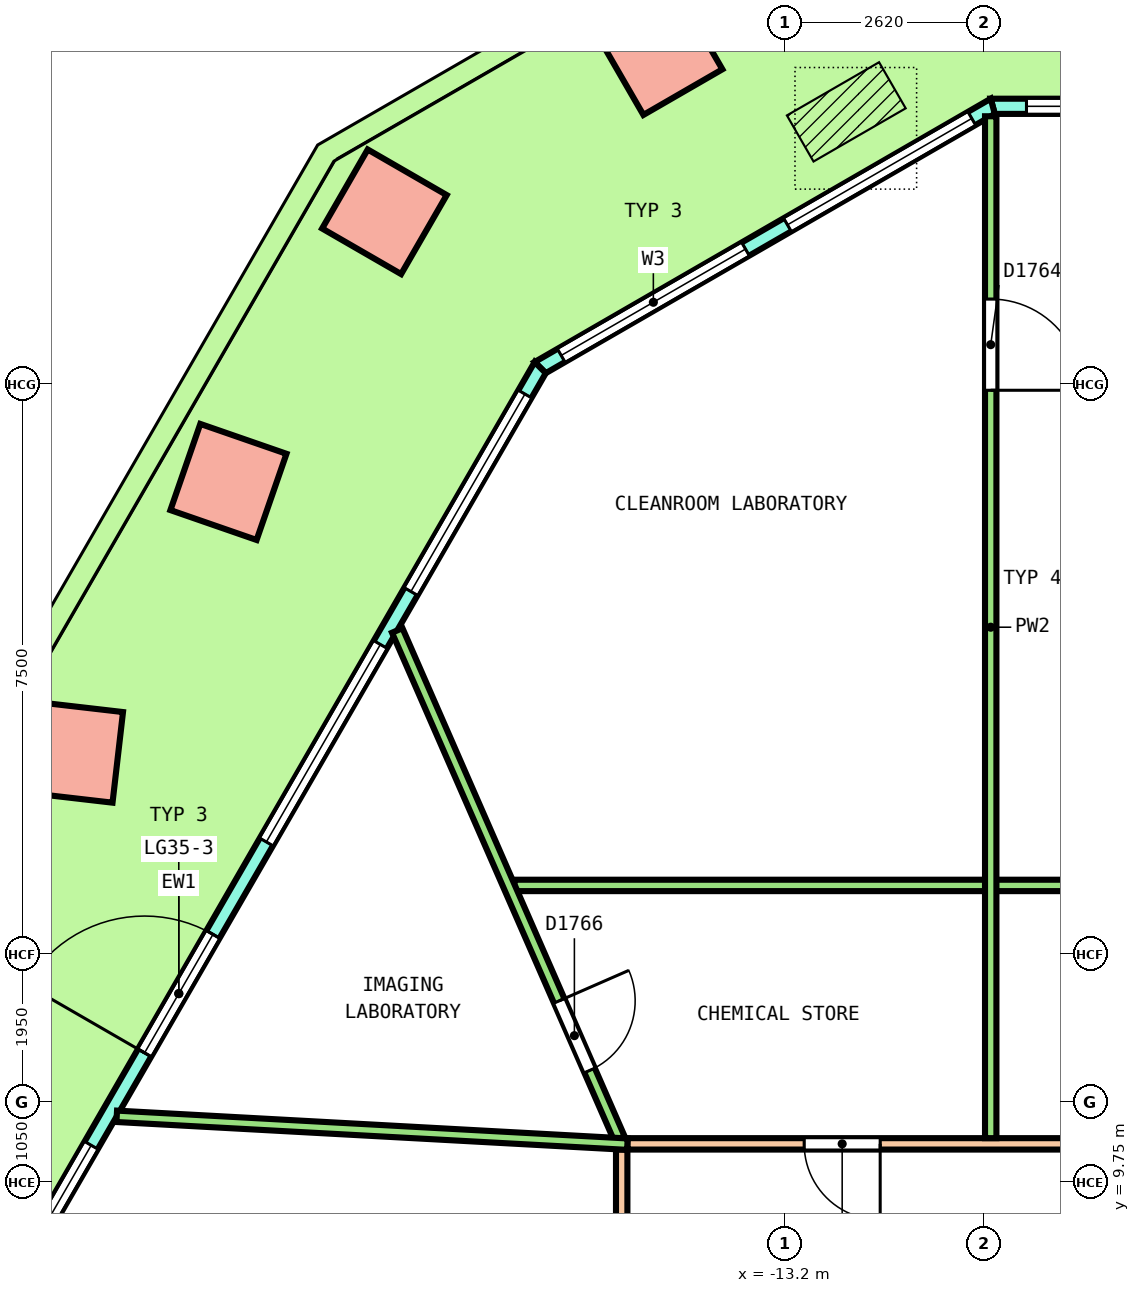
"""IFC4 building model, lengths in metres.
Left out: names, types, materials, properties, quantities, classifications, styles, units other than length and angle.
Written with IfcOpenShell. Run it as: python <this file> out.ifc"""

import sys

from ifc_helpers import new_model, si_unit, direction, frame, frame_2d, origin, origin_2d, place, context, subcontext, project, spatial, polyline, rectangle, outline, extrude, element, fill, save


model = new_model("IFC4")
c1 = context("Model", 3, precision=1e-05, world=origin(), true_north=direction((0.0, 1.0)))
c2 = subcontext(c1, "Body", "Model", "MODEL_VIEW")
j1 = project(units=[si_unit("LENGTHUNIT", "METRE"), si_unit("PLANEANGLEUNIT", "RADIAN")], contexts=[c1])
p1 = place(None, origin())
s1 = spatial("IfcSite", under=j1, at=p1, CompositionType="ELEMENT")
p2 = place(p1, origin())
s2 = spatial("IfcBuilding", under=s1, at=p2, CompositionType="ELEMENT")
p3 = place(p2, frame((0.0, 0.0, 162.8)))
s3 = spatial("IfcBuildingStorey", under=s2, at=p3, CompositionType="ELEMENT", Elevation=162.8)
for number, where, z_axis, x_axis in (
    (1, (-14.845, 24.606, 0.0), (-0.036, 0.0, 0.999), (-0.865, -0.5, -0.031)),
    (2, (-18.472, 22.512, 0.0), (-0.036, 0.0, 0.999), (-0.499, -0.866, -0.018)),
):
    element("IfcColumn", number, at=place(p3, frame(where, z_axis=z_axis, x_axis=x_axis)), inside=s3, PredefinedType="COLUMN", context=c2, shape_type="SweptSolid", body=[
        extrude(rectangle(XDim=1.2, YDim=1.2, at=origin_2d()), origin(), (0.0, 0.0, 1.0), 4.053),
    ])
p4 = place(p3, frame((-20.524, 18.958, 0.0), z_axis=(-0.032654187208, 0.006265748099, 0.999447069363), x_axis=(-0.499519823947, -0.866234008258, -0.010889831076)))
e3 = element("IfcColumn", 3, at=p4, inside=s3, PredefinedType="COLUMN", context=c2, shape_type="SweptSolid", body=[
    extrude(rectangle(XDim=1.2, YDim=1.2, at=origin_2d()), origin(), (0.0, 0.0, 1.0), 4.052),
])
p5 = place(p3, frame((-22.576, 15.404, 0.0), z_axis=(-0.029040860623, 0.012532155622, 0.999499661576), x_axis=(-0.499041572146, -0.866570424295, -0.003634419767)))
e4 = element("IfcColumn", 4, at=p5, inside=s3, PredefinedType="COLUMN", context=c2, shape_type="SweptSolid", body=[
    extrude(rectangle(XDim=1.2, YDim=1.2, at=origin_2d()), origin(), (0.0, 0.0, 1.0), 4.052),
])
p6 = place(p3, frame((10.468, 23.9, 0.0), z_axis=(0.0, 0.0, 1.0), x_axis=(-1.0, 0.0, 0.0)))
e5 = element("IfcWall", 5, at=p6, inside=s3, PredefinedType="SOLIDWALL", context=c2, shape_type="SweptSolid", body=[
    extrude(outline(polyline([(-0.027, -0.1), (1.023, -0.1), (2.072, -0.1), (3.122, -0.1), (4.171, -0.1), (5.221, -0.1), (6.27, -0.1), (7.32, -0.1), (8.369, -0.1), (9.419, -0.1), (10.468, -0.1), (11.518, -0.1), (12.567, -0.1), (13.617, -0.1), (14.666, -0.1), (15.716, -0.1), (16.765, -0.1), (17.815, -0.1), (18.864, -0.1), (19.914, -0.1), (20.963, -0.1), (20.91, 0.1), (19.865, 0.1), (18.821, 0.1), (17.777, 0.1), (16.733, 0.1), (15.689, 0.1), (14.645, 0.1), (13.601, 0.1), (12.557, 0.1), (11.512, 0.1), (10.468, 0.1), (9.424, 0.1), (8.38, 0.1), (7.336, 0.1), (6.292, 0.1), (5.248, 0.1), (4.203, 0.1), (3.159, 0.1), (2.115, 0.1), (1.071, 0.1), (0.027, 0.1), (-0.027, -0.1)])), origin(), (0.0, 0.0, 1.0), 4.1),
])
p7 = place(p6, frame((0.444, 0.0, 0.1)))
e6 = element("IfcOpeningElement", 6, at=p7, cuts=e5, PredefinedType="OPENING", context=c2, shape_type="SweptSolid", body=[
    extrude(rectangle(XDim=3.3, YDim=2.9, at=frame_2d((1.65, 1.45))), frame((0.0, 0.11, 0.0), z_axis=(0.0, -1.0, 0.0), x_axis=(1.0, 0.0, 0.0)), (0.0, 0.0, 1.0), 0.22),
])
p8 = place(p6, frame((4.631, 0.0, 0.1)))
e7 = element("IfcOpeningElement", 7, at=p8, cuts=e5, PredefinedType="OPENING", context=c2, shape_type="SweptSolid", body=[
    extrude(rectangle(XDim=3.3, YDim=2.9, at=frame_2d((1.65, 1.45))), frame((0.0, 0.11, 0.0), z_axis=(0.0, -1.0, 0.0), x_axis=(1.0, 0.0, 0.0)), (0.0, 0.0, 1.0), 0.22),
])
p9 = place(p6, frame((9.568, 0.0, 0.0)))
e8 = element("IfcOpeningElement", 8, at=p9, cuts=e5, PredefinedType="OPENING", context=c2, shape_type="SweptSolid", body=[
    extrude(rectangle(XDim=1.8, YDim=2.4, at=frame_2d((0.9, 1.2))), frame((0.0, 0.11, 0.0), z_axis=(0.0, -1.0, 0.0), x_axis=(1.0, 0.0, 0.0)), (0.0, 0.0, 1.0), 0.22),
])
p10 = place(p6, frame((9.568, 0.0, 2.55)))
e9 = element("IfcOpeningElement", 9, at=p10, cuts=e5, PredefinedType="OPENING", context=c2, shape_type="SweptSolid", body=[
    extrude(rectangle(XDim=1.8, YDim=0.45, at=frame_2d((0.9, 0.225))), frame((0.0, 0.11, 0.0), z_axis=(0.0, -1.0, 0.0), x_axis=(1.0, 0.0, 0.0)), (0.0, 0.0, 1.0), 0.22),
])
p11 = place(p6, frame((13.006, 0.0, 0.1)))
e10 = element("IfcOpeningElement", 10, at=p11, cuts=e5, PredefinedType="OPENING", context=c2, shape_type="SweptSolid", body=[
    extrude(rectangle(XDim=3.3, YDim=2.9, at=frame_2d((1.65, 1.45))), frame((0.0, 0.11, 0.0), z_axis=(0.0, -1.0, 0.0), x_axis=(1.0, 0.0, 0.0)), (0.0, 0.0, 1.0), 0.22),
])
p12 = place(p6, frame((17.193, 0.0, 0.1)))
e11 = element("IfcOpeningElement", 11, at=p12, cuts=e5, PredefinedType="OPENING", context=c2, shape_type="SweptSolid", body=[
    extrude(rectangle(XDim=3.3, YDim=2.9, at=frame_2d((1.65, 1.45))), frame((0.0, 0.11, 0.0), z_axis=(0.0, -1.0, 0.0), x_axis=(1.0, 0.0, 0.0)), (0.0, 0.0, 1.0), 0.22),
])
p13 = place(p3, frame((-10.468, 23.9, 0.0), z_axis=(0.0, 0.0, 1.0), x_axis=(-0.866029458321, -0.49999297727, 0.0)))
e12 = element("IfcWall", 12, at=p13, inside=s3, PredefinedType="SOLIDWALL", context=c2, shape_type="SweptSolid", body=[
    extrude(outline(polyline([(-0.027, -0.1), (1.128, -0.1), (2.282, -0.1), (3.437, -0.1), (4.592, -0.1), (5.747, -0.1), (6.901, -0.1), (6.848, 0.1), (5.711, 0.1), (4.574, 0.1), (3.437, 0.1), (2.301, 0.1), (1.164, 0.1), (0.027, 0.1), (-0.027, -0.1)])), origin(), (0.0, 0.0, 1.0), 4.1),
])
p14 = place(p13, frame((0.319, 0.0, 0.1)))
e13 = element("IfcOpeningElement", 13, at=p14, cuts=e12, PredefinedType="OPENING", context=c2, shape_type="SweptSolid", body=[
    extrude(rectangle(XDim=2.8, YDim=2.9, at=frame_2d((1.4, 1.45))), frame((0.0, 0.11, 0.0), z_axis=(0.0, -1.0, 0.0), x_axis=(1.0, 0.0, 0.0)), (0.0, 0.0, 1.0), 0.22),
])
p15 = place(p13, frame((3.756, 0.0, 0.1)))
e14 = element("IfcOpeningElement", 14, at=p15, cuts=e12, PredefinedType="OPENING", context=c2, shape_type="SweptSolid", body=[
    extrude(rectangle(XDim=2.8, YDim=2.9, at=frame_2d((1.4, 1.45))), frame((0.0, 0.11, 0.0), z_axis=(0.0, -1.0, 0.0), x_axis=(1.0, 0.0, 0.0)), (0.0, 0.0, 1.0), 0.22),
])
p16 = place(p3, frame((-16.422, 20.463, 0.0), z_axis=(0.0, 0.0, 1.0), x_axis=(-0.500001707189, -0.866024418136, 0.0)))
e15 = element("IfcWall", 15, at=p16, inside=s3, PredefinedType="SOLIDWALL", context=c2, shape_type="SweptSolid", body=[
    extrude(outline(polyline([(-0.027, -0.1), (0.977, -0.1), (1.981, -0.1), (2.985, -0.1), (3.989, -0.1), (4.993, -0.1), (5.997, -0.1), (7.0, -0.1), (8.004, -0.1), (9.008, -0.1), (10.012, -0.1), (11.016, -0.1), (12.02, -0.1), (13.024, -0.1), (14.028, -0.1), (15.032, -0.1), (16.036, -0.1), (17.04, -0.1), (18.043, -0.1), (19.047, -0.1), (18.994, 0.1), (17.995, 0.1), (16.997, 0.1), (15.999, 0.1), (15.001, 0.1), (14.002, 0.1), (13.004, 0.1), (12.006, 0.1), (11.008, 0.1), (10.009, 0.1), (9.011, 0.1), (8.013, 0.1), (7.015, 0.1), (6.016, 0.1), (5.018, 0.1), (4.02, 0.1), (3.022, 0.1), (2.023, 0.1), (1.025, 0.1), (0.027, 0.1), (-0.027, -0.1)])), origin(), (0.0, 0.0, 1.0), 4.1),
])
p17 = place(p16, frame((0.402, 0.0, 0.1)))
e16 = element("IfcOpeningElement", 16, at=p17, cuts=e15, PredefinedType="OPENING", context=c2, shape_type="SweptSolid", body=[
    extrude(rectangle(XDim=3.0, YDim=2.9, at=frame_2d((1.5, 1.45))), frame((0.0, 0.11, 0.0), z_axis=(0.0, -1.0, 0.0), x_axis=(1.0, 0.0, 0.0)), (0.0, 0.0, 1.0), 0.22),
])
p18 = place(p16, frame((4.206, 0.0, 0.1)))
e17 = element("IfcOpeningElement", 17, at=p18, cuts=e15, PredefinedType="OPENING", context=c2, shape_type="SweptSolid", body=[
    extrude(rectangle(XDim=3.0, YDim=2.9, at=frame_2d((1.5, 1.45))), frame((0.0, 0.11, 0.0), z_axis=(0.0, -1.0, 0.0), x_axis=(1.0, 0.0, 0.0)), (0.0, 0.0, 1.0), 0.22),
])
p19 = place(p16, frame((8.61, 0.0, 0.0)))
e18 = element("IfcOpeningElement", 18, at=p19, cuts=e15, PredefinedType="OPENING", context=c2, shape_type="SweptSolid", body=[
    extrude(rectangle(XDim=1.8, YDim=2.4, at=frame_2d((0.9, 1.2))), frame((0.0, 0.11, 0.0), z_axis=(0.0, -1.0, 0.0), x_axis=(1.0, 0.0, 0.0)), (0.0, 0.0, 1.0), 0.22),
])
p20 = place(p16, frame((8.61, 0.0, 2.55)))
e19 = element("IfcOpeningElement", 19, at=p20, cuts=e15, PredefinedType="OPENING", context=c2, shape_type="SweptSolid", body=[
    extrude(rectangle(XDim=1.8, YDim=0.45, at=frame_2d((0.9, 0.225))), frame((0.0, 0.11, 0.0), z_axis=(0.0, -1.0, 0.0), x_axis=(1.0, 0.0, 0.0)), (0.0, 0.0, 1.0), 0.22),
])
p21 = place(p16, frame((11.814, 0.0, 0.1)))
e20 = element("IfcOpeningElement", 20, at=p21, cuts=e15, PredefinedType="OPENING", context=c2, shape_type="SweptSolid", body=[
    extrude(rectangle(XDim=3.0, YDim=2.9, at=frame_2d((1.5, 1.45))), frame((0.0, 0.11, 0.0), z_axis=(0.0, -1.0, 0.0), x_axis=(1.0, 0.0, 0.0)), (0.0, 0.0, 1.0), 0.22),
])
p22 = place(p16, frame((15.618, 0.0, 0.1)))
e21 = element("IfcOpeningElement", 21, at=p22, cuts=e15, PredefinedType="OPENING", context=c2, shape_type="SweptSolid", body=[
    extrude(rectangle(XDim=3.0, YDim=2.9, at=frame_2d((1.5, 1.45))), frame((0.0, 0.11, 0.0), z_axis=(0.0, -1.0, 0.0), x_axis=(1.0, 0.0, 0.0)), (0.0, 0.0, 1.0), 0.22),
])
p23 = place(p3, frame((-15.275, 10.25, 0.0), z_axis=(0.0, 0.0, 1.0), x_axis=(1.0, 0.0, 0.0)))
e22 = element("IfcWall", 22, at=p23, inside=s3, PredefinedType="PARTITIONING", context=c2, shape_type="SweptSolid", body=[
    extrude(rectangle(XDim=30.55, YDim=0.15, at=frame_2d((15.275, 0.0))), origin(), (0.0, 0.0, 1.0), 3.05),
])
p24 = place(p23, frame((26.909, 0.0, 0.0)))
e23 = element("IfcOpeningElement", 23, at=p24, cuts=e22, PredefinedType="OPENING", context=c2, shape_type="SweptSolid", body=[
    extrude(rectangle(XDim=1.0, YDim=2.1, at=frame_2d((0.5, 1.05))), frame((0.0, 0.085, 0.0), z_axis=(0.0, -1.0, 0.0), x_axis=(1.0, 0.0, 0.0)), (0.0, 0.0, 1.0), 0.17),
])
p25 = place(p23, frame((14.675, 0.0, 0.0)))
e24 = element("IfcOpeningElement", 24, at=p25, cuts=e22, PredefinedType="OPENING", context=c2, shape_type="SweptSolid", body=[
    extrude(rectangle(XDim=1.2, YDim=2.1, at=frame_2d((0.6, 1.05))), frame((0.0, 0.085, 0.0), z_axis=(0.0, -1.0, 0.0), x_axis=(1.0, 0.0, 0.0)), (0.0, 0.0, 1.0), 0.17),
])
p26 = place(p23, frame((2.326, 0.0, 0.0)))
e25 = element("IfcOpeningElement", 25, at=p26, cuts=e22, PredefinedType="OPENING", context=c2, shape_type="SweptSolid", body=[
    extrude(rectangle(XDim=1.0, YDim=2.1, at=frame_2d((0.5, 1.05))), frame((0.0, 0.085, 0.0), z_axis=(0.0, -1.0, 0.0), x_axis=(1.0, 0.0, 0.0)), (0.0, 0.0, 1.0), 0.17),
])
p27 = place(p3, frame((-15.35, -0.254, 0.0), z_axis=(0.0, 0.0, 1.0), x_axis=(0.0, 1.0, 0.0)))
e26 = element("IfcWall", 26, at=p27, inside=s3, PredefinedType="PARTITIONING", context=c2, shape_type="SweptSolid", body=[
    extrude(rectangle(XDim=10.429, YDim=0.15, at=frame_2d((5.214, 0.0))), origin(), (0.0, 0.0, 1.0), 3.05),
])
p28 = place(p27, frame((3.312, 0.0, 0.0)))
e27 = element("IfcOpeningElement", 27, at=p28, cuts=e26, PredefinedType="OPENING", context=c2, shape_type="SweptSolid", body=[
    extrude(rectangle(XDim=1.2, YDim=2.1, at=frame_2d((0.6, 1.05))), frame((0.0, 0.085, 0.0), z_axis=(0.0, -1.0, 0.0), x_axis=(1.0, 0.0, 0.0)), (0.0, 0.0, 1.0), 0.17),
])
p29 = place(p3, frame((-16.761, 13.65, 0.0), z_axis=(0.0, 0.0, 1.0), x_axis=(1.0, 0.0, 0.0)))
e28 = element("IfcWall", 28, at=p29, inside=s3, PredefinedType="PARTITIONING", context=c2, shape_type="SweptSolid", body=[
    extrude(rectangle(XDim=27.182, YDim=0.15, at=frame_2d((13.591, 0.0))), origin(), (0.0, 0.0, 1.0), 3.05),
])
p30 = place(p3, frame((-10.495, 10.325, 0.0), z_axis=(0.0, 0.0, 1.0), x_axis=(0.0, 1.0, 0.0)))
e29 = element("IfcWall", 29, at=p30, inside=s3, PredefinedType="PARTITIONING", context=c2, shape_type="SweptSolid", body=[
    extrude(rectangle(XDim=13.444, YDim=0.15, at=frame_2d((6.722, 0.0))), origin(), (0.0, 0.0, 1.0), 3.05),
])
p31 = place(p30, frame((9.839, 0.0, 0.0)))
e30 = element("IfcOpeningElement", 30, at=p31, cuts=e29, PredefinedType="OPENING", context=c2, shape_type="SweptSolid", body=[
    extrude(rectangle(XDim=1.2, YDim=2.1, at=frame_2d((0.6, 1.05))), frame((0.0, 0.085, 0.0), z_axis=(0.0, -1.0, 0.0), x_axis=(1.0, 0.0, 0.0)), (0.0, 0.0, 1.0), 0.17),
])
p32 = place(p3, frame((-18.303, 17.004, 0.0), z_axis=(0.0, 0.0, 1.0), x_axis=(0.400595913262, -0.916254830425, 0.0)))
e31 = element("IfcWall", 31, at=p32, inside=s3, PredefinedType="PARTITIONING", context=c2, shape_type="SweptSolid", body=[
    extrude(rectangle(XDim=7.297, YDim=0.15, at=frame_2d((3.648, 0.0))), origin(), (0.0, 0.0, 1.0), 3.05),
])
p33 = place(p32, frame((5.318, 0.0, 0.0)))
e32 = element("IfcOpeningElement", 32, at=p33, cuts=e31, PredefinedType="OPENING", context=c2, shape_type="SweptSolid", body=[
    extrude(rectangle(XDim=1.0, YDim=2.1, at=frame_2d((0.5, 1.05))), frame((0.0, 0.085, 0.0), z_axis=(0.0, -1.0, 0.0), x_axis=(1.0, 0.0, 0.0)), (0.0, 0.0, 1.0), 0.17),
])
p34 = place(p3, frame((-21.993, 10.613, 0.0), z_axis=(0.0, 0.0, 1.0), x_axis=(0.998513698016, -0.054501329109, 0.0)))
e33 = element("IfcWall", 33, at=p34, inside=s3, PredefinedType="PARTITIONING", context=c2, shape_type="SweptSolid", body=[
    extrude(rectangle(XDim=6.728, YDim=0.15, at=frame_2d((3.364, 0.0))), origin(), (0.0, 0.0, 1.0), 3.05),
])
p35 = place(p12, origin())
e34 = element("IfcWindow", 34, at=p35, inside=s3, PartitioningType="SINGLE_PANEL", PredefinedType="WINDOW", context=c2, shape_type="SweptSolid", body=[
    extrude(rectangle(XDim=3.3, YDim=2.9, at=frame_2d((1.65, 1.45))), frame((0.0, 0.03, 0.0), z_axis=(0.0, -1.0, 0.0), x_axis=(1.0, 0.0, 0.0)), (0.0, 0.0, 1.0), 0.06),
])
fill(e11, e34)
p36 = place(p14, origin())
e35 = element("IfcWindow", 35, at=p36, inside=s3, PartitioningType="SINGLE_PANEL", PredefinedType="WINDOW", context=c2, shape_type="SweptSolid", body=[
    extrude(rectangle(XDim=2.8, YDim=2.9, at=frame_2d((1.4, 1.45))), frame((0.0, 0.03, 0.0), z_axis=(0.0, -1.0, 0.0), x_axis=(1.0, 0.0, 0.0)), (0.0, 0.0, 1.0), 0.06),
])
fill(e13, e35)
p37 = place(p15, origin())
e36 = element("IfcWindow", 36, at=p37, inside=s3, PartitioningType="SINGLE_PANEL", PredefinedType="WINDOW", context=c2, shape_type="SweptSolid", body=[
    extrude(rectangle(XDim=2.8, YDim=2.9, at=frame_2d((1.4, 1.45))), frame((0.0, 0.03, 0.0), z_axis=(0.0, -1.0, 0.0), x_axis=(1.0, 0.0, 0.0)), (0.0, 0.0, 1.0), 0.06),
])
fill(e14, e36)
p38 = place(p17, origin())
e37 = element("IfcWindow", 37, at=p38, inside=s3, PartitioningType="SINGLE_PANEL", PredefinedType="WINDOW", context=c2, shape_type="SweptSolid", body=[
    extrude(rectangle(XDim=3.0, YDim=2.9, at=frame_2d((1.5, 1.45))), frame((0.0, 0.03, 0.0), z_axis=(0.0, -1.0, 0.0), x_axis=(1.0, 0.0, 0.0)), (0.0, 0.0, 1.0), 0.06),
])
fill(e16, e37)
p39 = place(p18, origin())
e38 = element("IfcWindow", 38, at=p39, inside=s3, PartitioningType="SINGLE_PANEL", PredefinedType="WINDOW", context=c2, shape_type="SweptSolid", body=[
    extrude(rectangle(XDim=3.0, YDim=2.9, at=frame_2d((1.5, 1.45))), frame((0.0, 0.03, 0.0), z_axis=(0.0, -1.0, 0.0), x_axis=(1.0, 0.0, 0.0)), (0.0, 0.0, 1.0), 0.06),
])
fill(e17, e38)
p40 = place(p19, origin())
e39 = element("IfcDoor", 39, at=p40, inside=s3, OperationType="DOUBLE_DOOR_SINGLE_SWING", PredefinedType="DOOR", context=c2, shape_type="SweptSolid", body=[
    extrude(rectangle(XDim=1.8, YDim=2.4, at=frame_2d((0.9, 1.2))), frame((0.0, 0.025, 0.0), z_axis=(0.0, -1.0, 0.0), x_axis=(1.0, 0.0, 0.0)), (0.0, 0.0, 1.0), 0.05),
])
fill(e18, e39)
p41 = place(p20, origin())
e40 = element("IfcWindow", 40, at=p41, inside=s3, PartitioningType="SINGLE_PANEL", PredefinedType="WINDOW", context=c2, shape_type="SweptSolid", body=[
    extrude(rectangle(XDim=1.8, YDim=0.45, at=frame_2d((0.9, 0.225))), frame((0.0, 0.03, 0.0), z_axis=(0.0, -1.0, 0.0), x_axis=(1.0, 0.0, 0.0)), (0.0, 0.0, 1.0), 0.06),
])
fill(e19, e40)
p42 = place(p21, origin())
e41 = element("IfcWindow", 41, at=p42, inside=s3, PartitioningType="SINGLE_PANEL", PredefinedType="WINDOW", context=c2, shape_type="SweptSolid", body=[
    extrude(rectangle(XDim=3.0, YDim=2.9, at=frame_2d((1.5, 1.45))), frame((0.0, 0.03, 0.0), z_axis=(0.0, -1.0, 0.0), x_axis=(1.0, 0.0, 0.0)), (0.0, 0.0, 1.0), 0.06),
])
fill(e20, e41)
p43 = place(p31, origin())
e42 = element("IfcDoor", 42, at=p43, inside=s3, OperationType="DOUBLE_DOOR_SINGLE_SWING", PredefinedType="DOOR", context=c2, shape_type="SweptSolid", body=[
    extrude(rectangle(XDim=1.2, YDim=2.1, at=frame_2d((0.6, 1.05))), frame((0.0, 0.025, 0.0), z_axis=(0.0, -1.0, 0.0), x_axis=(1.0, 0.0, 0.0)), (0.0, 0.0, 1.0), 0.05),
])
fill(e30, e42)
p44 = place(p26, origin())
e43 = element("IfcDoor", 43, at=p44, inside=s3, OperationType="SINGLE_SWING_LEFT", PredefinedType="DOOR", context=c2, shape_type="SweptSolid", body=[
    extrude(rectangle(XDim=1.0, YDim=2.1, at=frame_2d((0.5, 1.05))), frame((0.0, 0.025, 0.0), z_axis=(0.0, -1.0, 0.0), x_axis=(1.0, 0.0, 0.0)), (0.0, 0.0, 1.0), 0.05),
])
fill(e25, e43)
p45 = place(p33, origin())
e44 = element("IfcDoor", 44, at=p45, inside=s3, OperationType="SINGLE_SWING_RIGHT", PredefinedType="DOOR", context=c2, shape_type="SweptSolid", body=[
    extrude(rectangle(XDim=1.0, YDim=2.1, at=frame_2d((0.5, 1.05))), frame((0.0, 0.025, 0.0), z_axis=(0.0, -1.0, 0.0), x_axis=(1.0, 0.0, 0.0)), (0.0, 0.0, 1.0), 0.05),
])
fill(e32, e44)
save(model, sys.argv[1])
